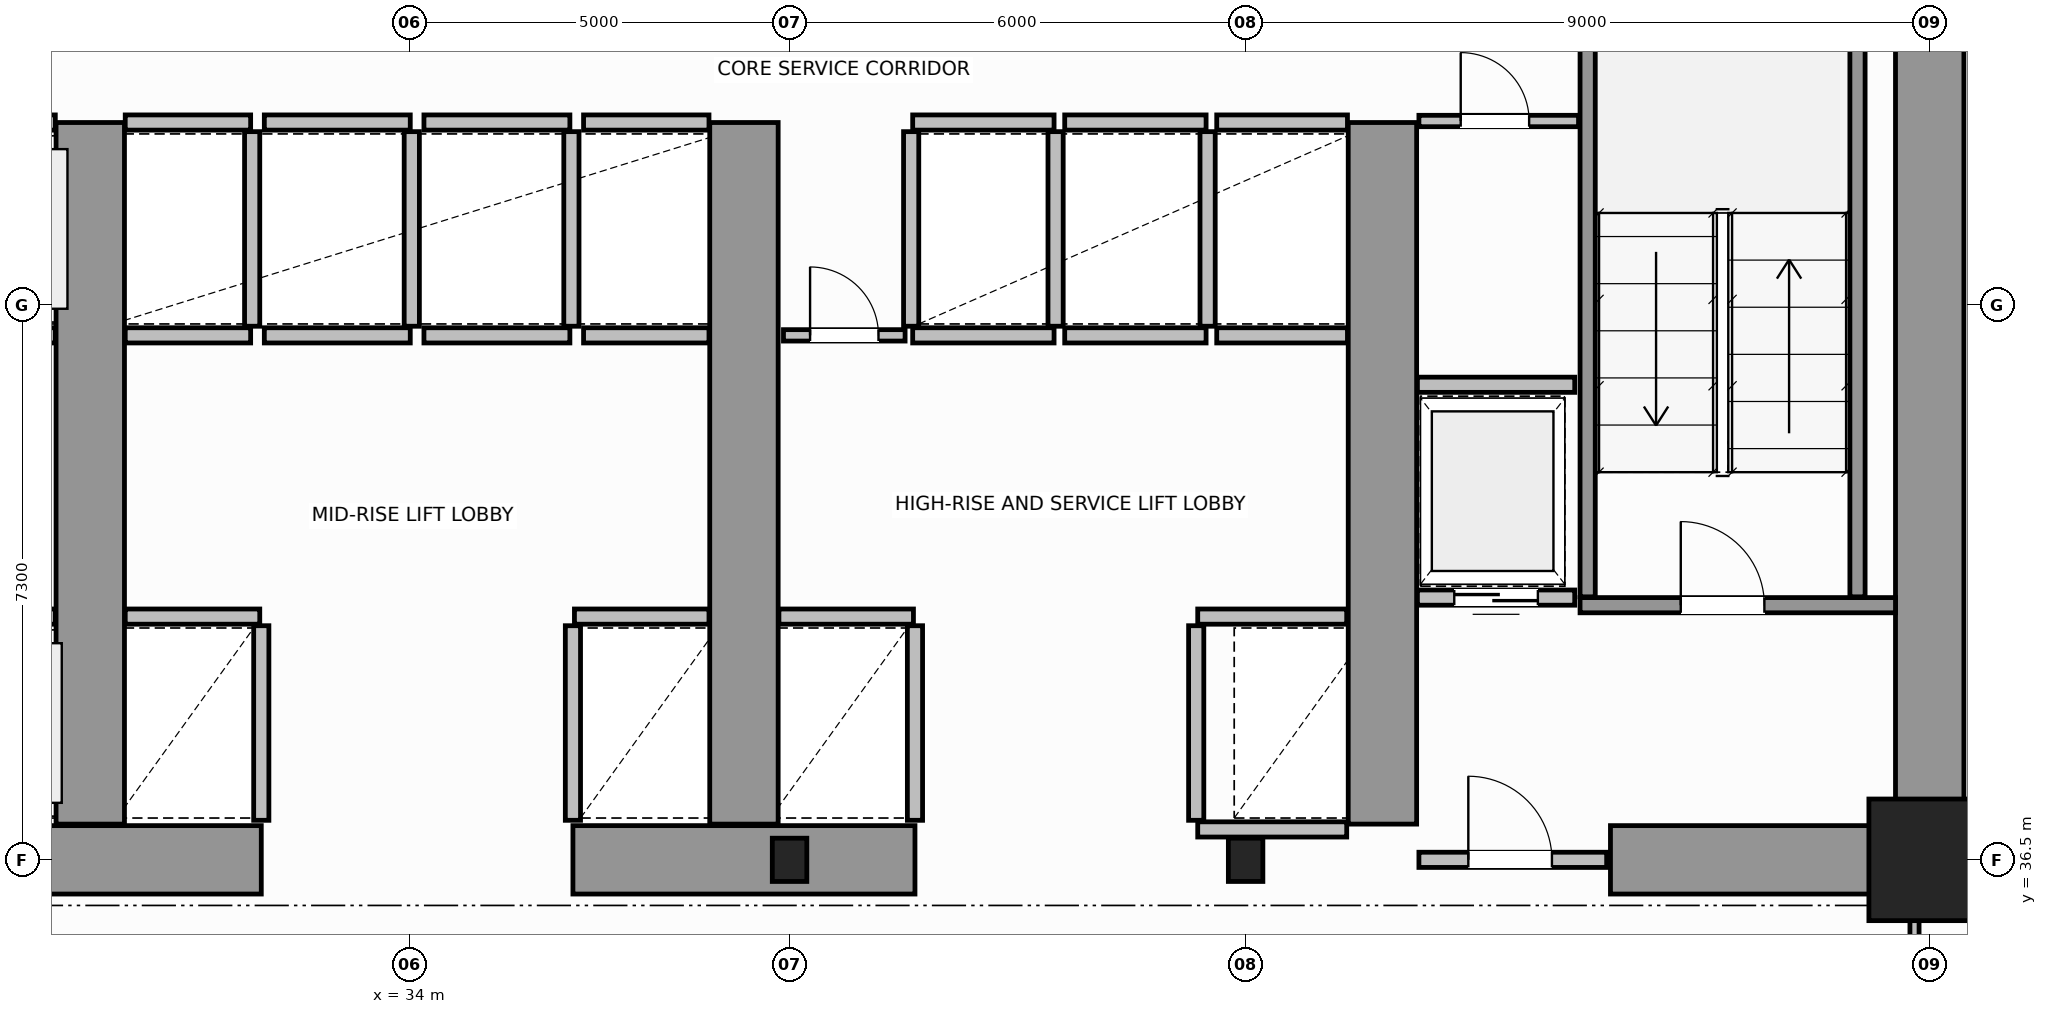
"""IFC4 building model, lengths in metres.
Left out: names, types, materials, properties, quantities, classifications, styles, units other than length and angle.
Written with IfcOpenShell. Run it as: python <this file> out.ifc"""

import sys

from ifc_helpers import new_model, si_unit, direction, frame, frame_2d, origin, origin_2d, place, context, subcontext, project, spatial, rectangle, i_section, extrude, source, transform, mapped, element, fill, save


model = new_model("IFC4")
c1 = context("Model", 3, precision=1e-05, world=origin(), true_north=direction((0.0, 1.0)))
c2 = subcontext(c1, "Body", "Model", "MODEL_VIEW")
j1 = project(units=[si_unit("LENGTHUNIT", "METRE"), si_unit("PLANEANGLEUNIT", "RADIAN")], contexts=[c1])
p1 = place(None, origin())
s1 = spatial("IfcSite", under=j1, at=p1, CompositionType="ELEMENT")
p2 = place(p1, origin())
s2 = spatial("IfcBuilding", under=s1, at=p2, CompositionType="ELEMENT")
p3 = place(p2, frame((0.0, 0.0, 53.0)))
s3 = spatial("IfcBuildingStorey", under=s2, at=p3, CompositionType="ELEMENT", Elevation=53.0)
m1 = source(origin(), c2, "Body", "SweptSolid", [
    extrude(i_section(OverallWidth=0.454, OverallDepth=0.569, WebThickness=0.078, FlangeThickness=0.08, FilletRadius=0.015, at=origin_2d()), origin(), (0.0, 0.0, 1.0), 3.8),
])
for number, where, z_axis, x_axis in (
    (1, (39.0, 36.5, 0.0), (0.0, 0.0, 1.0), (1.0, 0.0, 0.0)),
    (2, (45.0, 36.5, 0.0), (0.0, 0.0, 1.0), (1.0, 0.0, 0.0)),
):
    element("IfcColumn", number, at=place(p3, frame(where, z_axis=z_axis, x_axis=x_axis)), inside=s3, PredefinedType="COLUMN", context=c2, shape_type="MappedRepresentation", body=[
        mapped(m1, transform((0.0, 0.0, 0.0), scale=1.0)),
    ])
m2 = source(origin(), c2, "Body", "SweptSolid", [
    extrude(rectangle(XDim=1.6, YDim=1.6, at=origin_2d()), origin(), (0.0, 0.0, 1.0), 3.8),
])
p4 = place(p3, frame((54.0, 36.5, 0.0), z_axis=(0.0, 0.0, 1.0), x_axis=(1.0, 0.0, 0.0)))
e3 = element("IfcColumn", 3, at=p4, inside=s3, PredefinedType="COLUMN", context=c2, shape_type="MappedRepresentation", body=[
    mapped(m2, transform((0.0, 0.0, 0.0), scale=1.0)),
])
p5 = place(p3, frame((54.0, 36.5, 0.0), z_axis=(0.0, 0.0, 1.0), x_axis=(0.0, 1.0, 0.0)))
e4 = element("IfcWall", 4, at=p5, inside=s3, PredefinedType="SHEAR", context=c2, shape_type="SweptSolid", body=[
    extrude(rectangle(XDim=14.5, YDim=0.9, at=frame_2d((7.25, 0.0))), origin(), (0.0, 0.0, 1.0), 3.8),
])
for number, where, z_axis, x_axis in (
    (5, (27.55, 36.5, 0.0), (0.0, 0.0, 1.0), (1.0, 0.0, 0.0)),
    (6, (36.15, 36.5, 0.0), (0.0, 0.0, 1.0), (1.0, 0.0, 0.0)),
):
    element("IfcWall", number, at=place(p3, frame(where, z_axis=z_axis, x_axis=x_axis)), inside=s3, PredefinedType="SHEAR", context=c2, shape_type="SweptSolid", body=[
        extrude(rectangle(XDim=4.5, YDim=0.9, at=frame_2d((2.25, 0.0))), origin(), (0.0, 0.0, 1.0), 3.8),
    ])
p6 = place(p3, frame((49.8, 36.5, 0.0), z_axis=(0.0, 0.0, 1.0), x_axis=(1.0, 0.0, 0.0)))
e7 = element("IfcWall", 7, at=p6, inside=s3, PredefinedType="SHEAR", context=c2, shape_type="SweptSolid", body=[
    extrude(rectangle(XDim=3.73, YDim=0.9, at=frame_2d((1.865, 0.0))), origin(), (0.0, 0.0, 1.0), 2.38),
])
for number, where, z_axis, x_axis in (
    (8, (29.8, 36.97, 0.0), (0.0, 0.0, 1.0), (0.0, 1.0, 0.0)),
    (9, (38.4, 36.97, 0.0), (0.0, 0.0, 1.0), (0.0, 1.0, 0.0)),
    (10, (46.8, 36.97, 0.0), (0.0, 0.0, 1.0), (0.0, 1.0, 0.0)),
):
    element("IfcWall", number, at=place(p3, frame(where, z_axis=z_axis, x_axis=x_axis)), inside=s3, PredefinedType="SHEAR", context=c2, shape_type="SweptSolid", body=[
        extrude(rectangle(XDim=9.23, YDim=0.9, at=frame_2d((4.615, 0.0))), origin(), (0.0, 0.0, 1.0), 3.8),
    ])
p7 = place(p3, frame((49.4, 39.85, 0.0), z_axis=(0.0, 0.0, 1.0), x_axis=(1.0, 0.0, 0.0)))
e11 = element("IfcWall", 11, at=p7, inside=s3, PredefinedType="SOLIDWALL", context=c2, shape_type="SweptSolid", body=[
    extrude(rectangle(XDim=4.15, YDim=0.2, at=frame_2d((2.075, 0.0))), origin(), (0.0, 0.0, 1.0), 3.8),
])
p8 = place(p7, frame((1.325, 0.0, 0.0)))
e12 = element("IfcOpeningElement", 12, at=p8, cuts=e11, PredefinedType="OPENING", context=c2, shape_type="SweptSolid", body=[
    extrude(rectangle(XDim=1.1, YDim=2.15, at=frame_2d((0.55, 1.075))), frame((0.0, 0.11, 0.0), z_axis=(0.0, -1.0, 0.0), x_axis=(1.0, 0.0, 0.0)), (0.0, 0.0, 1.0), 0.22),
])
for number, where, z_axis, x_axis in (
    (13, (49.5, 39.96, 0.0), (0.0, 0.0, 1.0), (0.0, 1.0, 0.0)),
    (14, (53.05, 39.96, 0.0), (0.0, 0.0, 1.0), (0.0, 1.0, 0.0)),
):
    element("IfcWall", number, at=place(p3, frame(where, z_axis=z_axis, x_axis=x_axis)), inside=s3, PredefinedType="SOLIDWALL", context=c2, shape_type="SweptSolid", body=[
        extrude(rectangle(XDim=9.93, YDim=0.2, at=frame_2d((4.965, 0.0))), origin(), (0.0, 0.0, 1.0), 3.8),
    ])
p9 = place(p3, frame((47.28, 36.5, 0.0), z_axis=(0.0, 0.0, 1.0), x_axis=(1.0, 0.0, 0.0)))
e15 = element("IfcWall", 15, at=p9, inside=s3, PredefinedType="SOLIDWALL", context=c2, shape_type="SweptSolid", body=[
    extrude(rectangle(XDim=2.47, YDim=0.2, at=frame_2d((1.235, 0.0))), origin(), (0.0, 0.0, 1.0), 2.37),
])
p10 = place(p9, frame((0.65, 0.0, 0.0)))
e16 = element("IfcOpeningElement", 16, at=p10, cuts=e15, PredefinedType="OPENING", context=c2, shape_type="SweptSolid", body=[
    extrude(rectangle(XDim=1.1, YDim=2.15, at=frame_2d((0.55, 1.075))), frame((0.0, 0.11, 0.0), z_axis=(0.0, -1.0, 0.0), x_axis=(1.0, 0.0, 0.0)), (0.0, 0.0, 1.0), 0.22),
])
p11 = place(p3, frame((27.57, 39.7, 0.0), z_axis=(0.0, 0.0, 1.0), x_axis=(1.0, 0.0, 0.0)))
e17 = element("IfcWall", 17, at=p11, inside=s3, PredefinedType="SOLIDWALL", context=c2, shape_type="SweptSolid", body=[
    extrude(rectangle(XDim=1.77, YDim=0.2, at=frame_2d((0.885, 0.0))), origin(), (0.0, 0.0, 1.0), 3.58),
])
p12 = place(p11, frame((0.335, 0.0, 0.0)))
e18 = element("IfcOpeningElement", 18, at=p12, cuts=e17, PredefinedType="OPENING", context=c2, shape_type="SweptSolid", body=[
    extrude(rectangle(XDim=1.1, YDim=2.15, at=frame_2d((0.55, 1.075))), frame((0.0, 0.11, 0.0), z_axis=(0.0, -1.0, 0.0), x_axis=(1.0, 0.0, 0.0)), (0.0, 0.0, 1.0), 0.22),
])
p13 = place(p3, frame((27.69, 43.4, 0.0), z_axis=(0.0, 0.0, 1.0), x_axis=(1.0, 0.0, 0.0)))
e19 = element("IfcWall", 19, at=p13, inside=s3, PredefinedType="SOLIDWALL", context=c2, shape_type="SweptSolid", body=[
    extrude(rectangle(XDim=1.65, YDim=0.2, at=frame_2d((0.825, 0.0))), origin(), (0.0, 0.0, 1.0), 3.58),
])
p14 = place(p13, frame((0.275, 0.0, 0.0)))
e20 = element("IfcOpeningElement", 20, at=p14, cuts=e19, PredefinedType="OPENING", context=c2, shape_type="SweptSolid", body=[
    extrude(rectangle(XDim=1.1, YDim=2.15, at=frame_2d((0.55, 1.075))), frame((0.0, 0.11, 0.0), z_axis=(0.0, -1.0, 0.0), x_axis=(1.0, 0.0, 0.0)), (0.0, 0.0, 1.0), 0.22),
])
p15 = place(p3, frame((27.69, 46.2, 0.0), z_axis=(0.0, 0.0, 1.0), x_axis=(1.0, 0.0, 0.0)))
e21 = element("IfcWall", 21, at=p15, inside=s3, PredefinedType="SOLIDWALL", context=c2, shape_type="SweptSolid", body=[
    extrude(rectangle(XDim=1.65, YDim=0.2, at=frame_2d((0.825, 0.0))), origin(), (0.0, 0.0, 1.0), 3.58),
])
p16 = place(p3, frame((30.26, 39.7, 0.0), z_axis=(0.0, 0.0, 1.0), x_axis=(1.0, 0.0, 0.0)))
e22 = element("IfcWall", 22, at=p16, inside=s3, PredefinedType="SOLIDWALL", context=c2, shape_type="SweptSolid", body=[
    extrude(rectangle(XDim=1.77, YDim=0.2, at=frame_2d((0.885, 0.0))), origin(), (0.0, 0.0, 1.0), 3.58),
])
p17 = place(p3, frame((32.05, 37.02, 0.0), z_axis=(0.0, 0.0, 1.0), x_axis=(0.0, 1.0, 0.0)))
e23 = element("IfcWall", 23, at=p17, inside=s3, PredefinedType="SOLIDWALL", context=c2, shape_type="SweptSolid", body=[
    extrude(rectangle(XDim=2.56, YDim=0.2, at=frame_2d((1.28, 0.0))), origin(), (0.0, 0.0, 1.0), 3.58),
])
p18 = place(p3, frame((36.17, 39.7, 0.0), z_axis=(0.0, 0.0, 1.0), x_axis=(1.0, 0.0, 0.0)))
e24 = element("IfcWall", 24, at=p18, inside=s3, PredefinedType="SOLIDWALL", context=c2, shape_type="SweptSolid", body=[
    extrude(rectangle(XDim=1.77, YDim=0.2, at=frame_2d((0.885, 0.0))), origin(), (0.0, 0.0, 1.0), 3.58),
])
p19 = place(p3, frame((36.15, 37.02, 0.0), z_axis=(0.0, 0.0, 1.0), x_axis=(0.0, 1.0, 0.0)))
e25 = element("IfcWall", 25, at=p19, inside=s3, PredefinedType="SOLIDWALL", context=c2, shape_type="SweptSolid", body=[
    extrude(rectangle(XDim=2.56, YDim=0.2, at=frame_2d((1.28, 0.0))), origin(), (0.0, 0.0, 1.0), 3.58),
])
for number, where, z_axis, x_axis in (
    (26, (30.26, 43.4, 0.0), (0.0, 0.0, 1.0), (1.0, 0.0, 0.0)),
    (27, (30.26, 46.2, 0.0), (0.0, 0.0, 1.0), (1.0, 0.0, 0.0)),
):
    element("IfcWall", number, at=place(p3, frame(where, z_axis=z_axis, x_axis=x_axis)), inside=s3, PredefinedType="SOLIDWALL", context=c2, shape_type="SweptSolid", body=[
        extrude(rectangle(XDim=1.65, YDim=0.2, at=frame_2d((0.825, 0.0))), origin(), (0.0, 0.0, 1.0), 3.58),
    ])
p20 = place(p3, frame((31.93, 43.52, 0.0), z_axis=(0.0, 0.0, 1.0), x_axis=(0.0, 1.0, 0.0)))
e28 = element("IfcWall", 28, at=p20, inside=s3, PredefinedType="SOLIDWALL", context=c2, shape_type="SweptSolid", body=[
    extrude(rectangle(XDim=2.56, YDim=0.2, at=frame_2d((1.28, 0.0))), origin(), (0.0, 0.0, 1.0), 3.58),
])
for number, where, z_axis, x_axis in (
    (29, (32.09, 43.4, 0.0), (0.0, 0.0, 1.0), (1.0, 0.0, 0.0)),
    (30, (32.09, 46.2, 0.0), (0.0, 0.0, 1.0), (1.0, 0.0, 0.0)),
):
    element("IfcWall", number, at=place(p3, frame(where, z_axis=z_axis, x_axis=x_axis)), inside=s3, PredefinedType="SOLIDWALL", context=c2, shape_type="SweptSolid", body=[
        extrude(rectangle(XDim=1.92, YDim=0.2, at=frame_2d((0.96, 0.0))), origin(), (0.0, 0.0, 1.0), 3.58),
    ])
p21 = place(p3, frame((34.03, 43.52, 0.0), z_axis=(0.0, 0.0, 1.0), x_axis=(0.0, 1.0, 0.0)))
e31 = element("IfcWall", 31, at=p21, inside=s3, PredefinedType="SOLIDWALL", context=c2, shape_type="SweptSolid", body=[
    extrude(rectangle(XDim=2.56, YDim=0.2, at=frame_2d((1.28, 0.0))), origin(), (0.0, 0.0, 1.0), 3.58),
])
for number, where, z_axis, x_axis in (
    (32, (34.19, 43.4, 0.0), (0.0, 0.0, 1.0), (1.0, 0.0, 0.0)),
    (33, (34.19, 46.2, 0.0), (0.0, 0.0, 1.0), (1.0, 0.0, 0.0)),
):
    element("IfcWall", number, at=place(p3, frame(where, z_axis=z_axis, x_axis=x_axis)), inside=s3, PredefinedType="SOLIDWALL", context=c2, shape_type="SweptSolid", body=[
        extrude(rectangle(XDim=1.92, YDim=0.2, at=frame_2d((0.96, 0.0))), origin(), (0.0, 0.0, 1.0), 3.58),
    ])
p22 = place(p3, frame((36.13, 43.52, 0.0), z_axis=(0.0, 0.0, 1.0), x_axis=(0.0, 1.0, 0.0)))
e34 = element("IfcWall", 34, at=p22, inside=s3, PredefinedType="SOLIDWALL", context=c2, shape_type="SweptSolid", body=[
    extrude(rectangle(XDim=2.56, YDim=0.2, at=frame_2d((1.28, 0.0))), origin(), (0.0, 0.0, 1.0), 3.58),
])
for number, where, z_axis, x_axis in (
    (35, (36.29, 43.4, 0.0), (0.0, 0.0, 1.0), (1.0, 0.0, 0.0)),
    (36, (36.29, 46.2, 0.0), (0.0, 0.0, 1.0), (1.0, 0.0, 0.0)),
):
    element("IfcWall", number, at=place(p3, frame(where, z_axis=z_axis, x_axis=x_axis)), inside=s3, PredefinedType="SOLIDWALL", context=c2, shape_type="SweptSolid", body=[
        extrude(rectangle(XDim=1.65, YDim=0.2, at=frame_2d((0.825, 0.0))), origin(), (0.0, 0.0, 1.0), 3.58),
    ])
p23 = place(p3, frame((38.86, 39.7, 0.0), z_axis=(0.0, 0.0, 1.0), x_axis=(1.0, 0.0, 0.0)))
e37 = element("IfcWall", 37, at=p23, inside=s3, PredefinedType="SOLIDWALL", context=c2, shape_type="SweptSolid", body=[
    extrude(rectangle(XDim=1.77, YDim=0.2, at=frame_2d((0.885, 0.0))), origin(), (0.0, 0.0, 1.0), 3.58),
])
p24 = place(p3, frame((40.65, 37.02, 0.0), z_axis=(0.0, 0.0, 1.0), x_axis=(0.0, 1.0, 0.0)))
e38 = element("IfcWall", 38, at=p24, inside=s3, PredefinedType="SOLIDWALL", context=c2, shape_type="SweptSolid", body=[
    extrude(rectangle(XDim=2.56, YDim=0.2, at=frame_2d((1.28, 0.0))), origin(), (0.0, 0.0, 1.0), 3.58),
])
p25 = place(p3, frame((44.37, 39.7, 0.0), z_axis=(0.0, 0.0, 1.0), x_axis=(1.0, 0.0, 0.0)))
e39 = element("IfcWall", 39, at=p25, inside=s3, PredefinedType="SOLIDWALL", context=c2, shape_type="SweptSolid", body=[
    extrude(rectangle(XDim=1.96, YDim=0.2, at=frame_2d((0.98, 0.0))), origin(), (0.0, 0.0, 1.0), 3.58),
])
p26 = place(p3, frame((44.37, 36.9, 0.0), z_axis=(0.0, 0.0, 1.0), x_axis=(1.0, 0.0, 0.0)))
e40 = element("IfcWall", 40, at=p26, inside=s3, PredefinedType="SOLIDWALL", context=c2, shape_type="SweptSolid", body=[
    extrude(rectangle(XDim=1.96, YDim=0.2, at=frame_2d((0.98, 0.0))), origin(), (0.0, 0.0, 1.0), 2.37),
])
p27 = place(p3, frame((44.35, 37.02, 0.0), z_axis=(0.0, 0.0, 1.0), x_axis=(0.0, 1.0, 0.0)))
e41 = element("IfcWall", 41, at=p27, inside=s3, PredefinedType="SOLIDWALL", context=c2, shape_type="SweptSolid", body=[
    extrude(rectangle(XDim=2.56, YDim=0.2, at=frame_2d((1.28, 0.0))), origin(), (0.0, 0.0, 1.0), 3.58),
])
for number, where, z_axis, x_axis in (
    (42, (40.62, 43.4, 0.0), (0.0, 0.0, 1.0), (1.0, 0.0, 0.0)),
    (43, (40.62, 46.2, 0.0), (0.0, 0.0, 1.0), (1.0, 0.0, 0.0)),
):
    element("IfcWall", number, at=place(p3, frame(where, z_axis=z_axis, x_axis=x_axis)), inside=s3, PredefinedType="SOLIDWALL", context=c2, shape_type="SweptSolid", body=[
        extrude(rectangle(XDim=1.86, YDim=0.2, at=frame_2d((0.93, 0.0))), origin(), (0.0, 0.0, 1.0), 3.58),
    ])
for number, where, z_axis, x_axis in (
    (44, (40.6, 43.52, 0.0), (0.0, 0.0, 1.0), (0.0, 1.0, 0.0)),
    (45, (42.5, 43.52, 0.0), (0.0, 0.0, 1.0), (0.0, 1.0, 0.0)),
):
    element("IfcWall", number, at=place(p3, frame(where, z_axis=z_axis, x_axis=x_axis)), inside=s3, PredefinedType="SOLIDWALL", context=c2, shape_type="SweptSolid", body=[
        extrude(rectangle(XDim=2.56, YDim=0.2, at=frame_2d((1.28, 0.0))), origin(), (0.0, 0.0, 1.0), 3.58),
    ])
for number, where, z_axis, x_axis in (
    (46, (42.62, 43.4, 0.0), (0.0, 0.0, 1.0), (1.0, 0.0, 0.0)),
    (47, (42.62, 46.2, 0.0), (0.0, 0.0, 1.0), (1.0, 0.0, 0.0)),
):
    element("IfcWall", number, at=place(p3, frame(where, z_axis=z_axis, x_axis=x_axis)), inside=s3, PredefinedType="SOLIDWALL", context=c2, shape_type="SweptSolid", body=[
        extrude(rectangle(XDim=1.86, YDim=0.2, at=frame_2d((0.93, 0.0))), origin(), (0.0, 0.0, 1.0), 3.58),
    ])
p28 = place(p3, frame((44.5, 43.52, 0.0), z_axis=(0.0, 0.0, 1.0), x_axis=(0.0, 1.0, 0.0)))
e48 = element("IfcWall", 48, at=p28, inside=s3, PredefinedType="SOLIDWALL", context=c2, shape_type="SweptSolid", body=[
    extrude(rectangle(XDim=2.56, YDim=0.2, at=frame_2d((1.28, 0.0))), origin(), (0.0, 0.0, 1.0), 3.58),
])
for number, where, z_axis, x_axis in (
    (49, (44.62, 43.4, 0.0), (0.0, 0.0, 1.0), (1.0, 0.0, 0.0)),
    (50, (44.62, 46.2, 0.0), (0.0, 0.0, 1.0), (1.0, 0.0, 0.0)),
):
    element("IfcWall", number, at=place(p3, frame(where, z_axis=z_axis, x_axis=x_axis)), inside=s3, PredefinedType="SOLIDWALL", context=c2, shape_type="SweptSolid", body=[
        extrude(rectangle(XDim=1.72, YDim=0.2, at=frame_2d((0.86, 0.0))), origin(), (0.0, 0.0, 1.0), 3.58),
    ])
p29 = place(p3, frame((47.26, 39.95, 0.0), z_axis=(0.0, 0.0, 1.0), x_axis=(1.0, 0.0, 0.0)))
e51 = element("IfcWall", 51, at=p29, inside=s3, PredefinedType="SOLIDWALL", context=c2, shape_type="SweptSolid", body=[
    extrude(rectangle(XDim=2.07, YDim=0.2, at=frame_2d((1.035, 0.0))), origin(), (0.0, 0.0, 1.0), 3.58),
])
p30 = place(p29, frame((0.485, 0.0, 0.0)))
e52 = element("IfcOpeningElement", 52, at=p30, cuts=e51, PredefinedType="OPENING", context=c2, shape_type="SweptSolid", body=[
    extrude(rectangle(XDim=1.1, YDim=2.15, at=frame_2d((0.55, 1.075))), frame((0.0, 0.11, 0.0), z_axis=(0.0, -1.0, 0.0), x_axis=(1.0, 0.0, 0.0)), (0.0, 0.0, 1.0), 0.22),
])
p31 = place(p3, frame((47.26, 42.75, 0.0), z_axis=(0.0, 0.0, 1.0), x_axis=(1.0, 0.0, 0.0)))
e53 = element("IfcWall", 53, at=p31, inside=s3, PredefinedType="SOLIDWALL", context=c2, shape_type="SweptSolid", body=[
    extrude(rectangle(XDim=2.07, YDim=0.2, at=frame_2d((1.035, 0.0))), origin(), (0.0, 0.0, 1.0), 3.58),
])
p32 = place(p3, frame((47.28, 46.22, 0.0), z_axis=(0.0, 0.0, 1.0), x_axis=(1.0, 0.0, 0.0)))
e54 = element("IfcWall", 54, at=p32, inside=s3, PredefinedType="PARTITIONING", context=c2, shape_type="SweptSolid", body=[
    extrude(rectangle(XDim=2.1, YDim=0.15, at=frame_2d((1.05, 0.0))), origin(), (0.0, 0.0, 1.0), 3.58),
])
p33 = place(p32, frame((0.55, 0.0, 0.0)))
e55 = element("IfcOpeningElement", 55, at=p33, cuts=e54, PredefinedType="OPENING", context=c2, shape_type="SweptSolid", body=[
    extrude(rectangle(XDim=0.9, YDim=2.1, at=frame_2d((0.45, 1.05))), frame((0.0, 0.085, 0.0), z_axis=(0.0, -1.0, 0.0), x_axis=(1.0, 0.0, 0.0)), (0.0, 0.0, 1.0), 0.17),
])
p34 = place(p3, frame((38.92, 43.4, 0.0), z_axis=(0.0, 0.0, 1.0), x_axis=(1.0, 0.0, 0.0)))
e56 = element("IfcWall", 56, at=p34, inside=s3, PredefinedType="PARTITIONING", context=c2, shape_type="SweptSolid", body=[
    extrude(rectangle(XDim=1.6, YDim=0.15, at=frame_2d((0.8, 0.0))), origin(), (0.0, 0.0, 1.0), 3.58),
])
p35 = place(p34, frame((0.35, 0.0, 0.0)))
e57 = element("IfcOpeningElement", 57, at=p35, cuts=e56, PredefinedType="OPENING", context=c2, shape_type="SweptSolid", body=[
    extrude(rectangle(XDim=0.9, YDim=2.1, at=frame_2d((0.45, 1.05))), frame((0.0, 0.085, 0.0), z_axis=(0.0, -1.0, 0.0), x_axis=(1.0, 0.0, 0.0)), (0.0, 0.0, 1.0), 0.17),
])
p36 = place(p3, frame((53.8, 34.16, 0.0), z_axis=(0.0, 0.0, 1.0), x_axis=(0.0, 1.0, 0.0)))
e58 = element("IfcWall", 58, at=p36, inside=s3, PredefinedType="PARTITIONING", context=c2, shape_type="SweptSolid", body=[
    extrude(rectangle(XDim=2.28, YDim=0.12, at=frame_2d((1.14, 0.0))), origin(), (0.0, 0.0, 1.0), 3.58),
])
p37 = place(p36, frame((0.3, 0.0, 0.0)))
e59 = element("IfcOpeningElement", 59, at=p37, cuts=e58, PredefinedType="OPENING", context=c2, shape_type="SweptSolid", body=[
    extrude(rectangle(XDim=0.9, YDim=2.15, at=frame_2d((0.45, 1.075))), frame((0.0, 0.07, 0.0), z_axis=(0.0, -1.0, 0.0), x_axis=(1.0, 0.0, 0.0)), (0.0, 0.0, 1.0), 0.14),
])
m3 = source(origin(), c2, "Body", "SweptSolid", [
    extrude(rectangle(XDim=1.1, YDim=2.15, at=frame_2d((0.55, 1.075))), frame((0.0, 0.025, 0.0), z_axis=(0.0, -1.0, 0.0), x_axis=(1.0, 0.0, 0.0)), (0.0, 0.0, 1.0), 0.05),
])
p38 = place(p8, origin())
e60 = element("IfcDoor", 60, at=p38, inside=s3, OperationType="SINGLE_SWING_RIGHT", PredefinedType="DOOR", context=c2, shape_type="MappedRepresentation", body=[
    mapped(m3, transform((0.0, 0.0, 0.0), scale=1.0)),
])
fill(e12, e60)
p39 = place(p10, origin())
e61 = element("IfcDoor", 61, at=p39, inside=s3, OperationType="SINGLE_SWING_LEFT", PredefinedType="DOOR", context=c2, shape_type="MappedRepresentation", body=[
    mapped(m3, transform((0.0, 0.0, 0.0), scale=1.0)),
])
fill(e16, e61)
p40 = place(p30, origin())
e62 = element("IfcDoor", 62, at=p40, inside=s3, OperationType="DOUBLE_DOOR_SLIDING", PredefinedType="DOOR", context=c2, shape_type="MappedRepresentation", body=[
    mapped(m3, transform((0.0, 0.0, 0.0), scale=1.0)),
])
fill(e52, e62)
m4 = source(origin(), c2, "Body", "SweptSolid", [
    extrude(rectangle(XDim=0.9, YDim=2.1, at=frame_2d((0.45, 1.05))), frame((0.0, 0.025, 0.0), z_axis=(0.0, -1.0, 0.0), x_axis=(1.0, 0.0, 0.0)), (0.0, 0.0, 1.0), 0.05),
])
p41 = place(p33, origin())
e63 = element("IfcDoor", 63, at=p41, inside=s3, OperationType="SINGLE_SWING_RIGHT", PredefinedType="DOOR", context=c2, shape_type="MappedRepresentation", body=[
    mapped(m4, transform((0.0, 0.0, 0.0), scale=1.0)),
])
fill(e55, e63)
p42 = place(p35, origin())
e64 = element("IfcDoor", 64, at=p42, inside=s3, OperationType="SINGLE_SWING_LEFT", PredefinedType="DOOR", context=c2, shape_type="MappedRepresentation", body=[
    mapped(m4, transform((0.0, 0.0, 0.0), scale=1.0)),
])
fill(e57, e64)
save(model, sys.argv[1])
